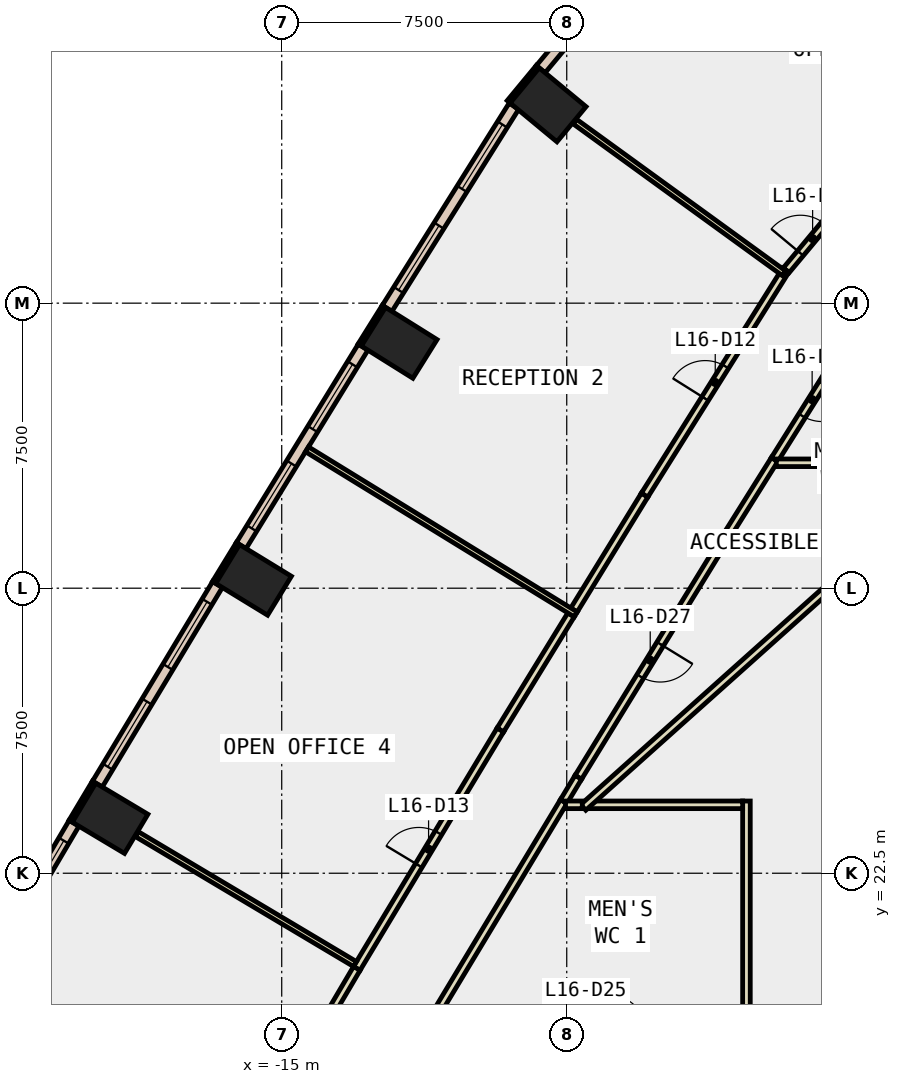
"""IFC4 building model, lengths in metres.
Left out: names, types, materials, properties, quantities, classifications, styles, units other than length and angle.
Written with IfcOpenShell. Run it as: python <this file> out.ifc"""

import sys

from ifc_helpers import new_model, si_unit, direction, frame, frame_2d, origin, origin_2d, place, context, subcontext, project, spatial, rectangle, extrude, element, fill, save


model = new_model("IFC4")
c1 = context("Model", 3, precision=1e-05, world=origin(), true_north=direction((0.0, 1.0)))
c2 = subcontext(c1, "Body", "Model", "MODEL_VIEW")
j1 = project(units=[si_unit("LENGTHUNIT", "METRE"), si_unit("PLANEANGLEUNIT", "RADIAN")], contexts=[c1])
p1 = place(None, origin())
s1 = spatial("IfcSite", under=j1, at=p1, CompositionType="ELEMENT")
p2 = place(p1, origin())
s2 = spatial("IfcBuilding", under=s1, at=p2, CompositionType="ELEMENT")
p3 = place(p2, frame((0.0, 0.0, 77.0)))
s3 = spatial("IfcBuildingStorey", under=s2, at=p3, CompositionType="ELEMENT", Elevation=77.0)
for number, where, z_axis, x_axis in (
    (1, (-7.991, 42.718, -0.4), (0.0, 0.0, 1.0), (0.638, 0.77, 0.0)),
    (2, (-11.909, 36.457, -0.4), (0.0, 0.0, 1.0), (0.53, 0.848, 0.0)),
    (3, (-15.741, 30.219, -0.4), (0.0, 0.0, 1.0), (0.522, 0.853, 0.0)),
    (4, (-19.516, 23.947, -0.4), (0.0, 0.0, 1.0), (0.513, 0.858, 0.0)),
):
    element("IfcColumn", number, at=place(p3, frame(where, z_axis=z_axis, x_axis=x_axis)), inside=s3, PredefinedType="COLUMN", context=c2, shape_type="SweptSolid", body=[
        extrude(rectangle(XDim=1.2, YDim=1.6, at=origin_2d()), origin(), (0.0, 0.0, 1.0), 4.0),
    ])
for number, where, z_axis, x_axis in (
    (5, (-8.263, 43.722, 0.0), (0.0, 0.0, 1.0), (-0.638, -0.77, 0.0)),
    (6, (-12.312, 37.416, 0.0), (0.0, 0.0, 1.0), (-0.53, -0.848, 0.0)),
):
    element("IfcWall", number, at=place(p3, frame(where, z_axis=z_axis, x_axis=x_axis)), inside=s3, PredefinedType="STANDARD", context=c2, shape_type="SweptSolid", body=[
        extrude(rectangle(XDim=1.199, YDim=0.1, at=frame_2d((0.6, 0.0))), origin(), (0.0, 0.0, 1.0), 3.6),
    ])
p4 = place(p3, frame((-16.153, 31.174, 0.0), z_axis=(0.0, 0.0, 1.0), x_axis=(-0.521507599072, -0.853246637327, 0.0)))
e7 = element("IfcWall", 7, at=p4, inside=s3, PredefinedType="STANDARD", context=c2, shape_type="SweptSolid", body=[
    extrude(rectangle(XDim=1.2, YDim=0.1, at=frame_2d((0.6, 0.0))), origin(), (0.0, 0.0, 1.0), 3.6),
])
p5 = place(p3, frame((-19.938, 24.898, 0.0), z_axis=(0.0, 0.0, 1.0), x_axis=(-0.513238760752, -0.858245870635, 0.0)))
e8 = element("IfcWall", 8, at=p5, inside=s3, PredefinedType="STANDARD", context=c2, shape_type="SweptSolid", body=[
    extrude(rectangle(XDim=1.2, YDim=0.1, at=frame_2d((0.6, 0.0))), origin(), (0.0, 0.0, 1.0), 3.6),
])
p6 = place(p3, frame((-5.681, 46.658, 0.0), z_axis=(0.0, 0.0, 1.0), x_axis=(-0.640565172846, -0.767903808649, 0.0)))
e9 = element("IfcWall", 9, at=p6, inside=s3, PredefinedType="STANDARD", context=c2, shape_type="SweptSolid", body=[
    extrude(rectangle(XDim=3.909, YDim=0.3, at=frame_2d((1.955, 0.0))), origin(), (0.0, 0.0, 1.0), 3.6),
])
p7 = place(p6, frame((1.255, 0.0, 0.9)))
e10 = element("IfcOpeningElement", 10, at=p7, cuts=e9, PredefinedType="OPENING", context=c2, shape_type="SweptSolid", body=[
    extrude(rectangle(XDim=1.4, YDim=2.6, at=frame_2d((0.7, 1.3))), frame((0.0, 0.16, 0.0), z_axis=(0.0, -1.0, 0.0), x_axis=(1.0, 0.0, 0.0)), (0.0, 0.0, 1.0), 0.32),
])
p8 = place(p3, frame((-8.889, 42.684, 0.0), z_axis=(0.0, 0.0, 1.0), x_axis=(-0.531357111884, -0.847147932565, 0.0)))
e11 = element("IfcWall", 11, at=p8, inside=s3, PredefinedType="STANDARD", context=c2, shape_type="SweptSolid", body=[
    extrude(rectangle(XDim=6.282, YDim=0.3, at=frame_2d((3.141, 0.0))), origin(), (0.0, 0.0, 1.0), 3.6),
])
p9 = place(p8, frame((0.571, 0.0, 0.9)))
e12 = element("IfcOpeningElement", 12, at=p9, cuts=e11, PredefinedType="OPENING", context=c2, shape_type="SweptSolid", body=[
    extrude(rectangle(XDim=2.0, YDim=2.6, at=frame_2d((1.0, 1.3))), frame((0.0, 0.16, 0.0), z_axis=(0.0, -1.0, 0.0), x_axis=(1.0, 0.0, 0.0)), (0.0, 0.0, 1.0), 0.32),
])
p10 = place(p8, frame((3.712, 0.0, 0.9)))
e13 = element("IfcOpeningElement", 13, at=p10, cuts=e11, PredefinedType="OPENING", context=c2, shape_type="SweptSolid", body=[
    extrude(rectangle(XDim=2.0, YDim=2.6, at=frame_2d((1.0, 1.3))), frame((0.0, 0.16, 0.0), z_axis=(0.0, -1.0, 0.0), x_axis=(1.0, 0.0, 0.0)), (0.0, 0.0, 1.0), 0.32),
])
p11 = place(p3, frame((-12.858, 36.344, 0.0), z_axis=(0.0, 0.0, 1.0), x_axis=(-0.523421823151, -0.852073702827, 0.0)))
e14 = element("IfcWall", 14, at=p11, inside=s3, PredefinedType="STANDARD", context=c2, shape_type="SweptSolid", body=[
    extrude(rectangle(XDim=6.131, YDim=0.3, at=frame_2d((3.065, 0.0))), origin(), (0.0, 0.0, 1.0), 3.6),
])
p12 = place(p11, frame((0.533, 0.0, 0.9)))
e15 = element("IfcOpeningElement", 15, at=p12, cuts=e14, PredefinedType="OPENING", context=c2, shape_type="SweptSolid", body=[
    extrude(rectangle(XDim=2.0, YDim=2.6, at=frame_2d((1.0, 1.3))), frame((0.0, 0.16, 0.0), z_axis=(0.0, -1.0, 0.0), x_axis=(1.0, 0.0, 0.0)), (0.0, 0.0, 1.0), 0.32),
])
p13 = place(p11, frame((3.598, 0.0, 0.9)))
e16 = element("IfcOpeningElement", 16, at=p13, cuts=e14, PredefinedType="OPENING", context=c2, shape_type="SweptSolid", body=[
    extrude(rectangle(XDim=2.0, YDim=2.6, at=frame_2d((1.0, 1.3))), frame((0.0, 0.16, 0.0), z_axis=(0.0, -1.0, 0.0), x_axis=(1.0, 0.0, 0.0)), (0.0, 0.0, 1.0), 0.32),
])
p14 = place(p3, frame((-16.69, 30.097, 0.0), z_axis=(0.0, 0.0, 1.0), x_axis=(-0.515690089348, -0.856775193238, 0.0)))
e17 = element("IfcWall", 17, at=p14, inside=s3, PredefinedType="STANDARD", context=c2, shape_type="SweptSolid", body=[
    extrude(rectangle(XDim=6.13, YDim=0.3, at=frame_2d((3.065, 0.0))), origin(), (0.0, 0.0, 1.0), 3.6),
])
p15 = place(p14, frame((0.532, 0.0, 0.9)))
e18 = element("IfcOpeningElement", 18, at=p15, cuts=e17, PredefinedType="OPENING", context=c2, shape_type="SweptSolid", body=[
    extrude(rectangle(XDim=2.0, YDim=2.6, at=frame_2d((1.0, 1.3))), frame((0.0, 0.16, 0.0), z_axis=(0.0, -1.0, 0.0), x_axis=(1.0, 0.0, 0.0)), (0.0, 0.0, 1.0), 0.32),
])
p16 = place(p14, frame((3.597, 0.0, 0.9)))
e19 = element("IfcOpeningElement", 19, at=p16, cuts=e17, PredefinedType="OPENING", context=c2, shape_type="SweptSolid", body=[
    extrude(rectangle(XDim=2.0, YDim=2.6, at=frame_2d((1.0, 1.3))), frame((0.0, 0.16, 0.0), z_axis=(0.0, -1.0, 0.0), x_axis=(1.0, 0.0, 0.0)), (0.0, 0.0, 1.0), 0.32),
])
p17 = place(p3, frame((-20.464, 23.816, 0.0), z_axis=(0.0, 0.0, 1.0), x_axis=(-0.507716058644, -0.861524465001, 0.0)))
e20 = element("IfcWall", 20, at=p17, inside=s3, PredefinedType="STANDARD", context=c2, shape_type="SweptSolid", body=[
    extrude(rectangle(XDim=6.131, YDim=0.3, at=frame_2d((3.065, 0.0))), origin(), (0.0, 0.0, 1.0), 3.6),
])
p18 = place(p17, frame((0.533, 0.0, 0.9)))
e21 = element("IfcOpeningElement", 21, at=p18, cuts=e20, PredefinedType="OPENING", context=c2, shape_type="SweptSolid", body=[
    extrude(rectangle(XDim=2.0, YDim=2.6, at=frame_2d((1.0, 1.3))), frame((0.0, 0.16, 0.0), z_axis=(0.0, -1.0, 0.0), x_axis=(1.0, 0.0, 0.0)), (0.0, 0.0, 1.0), 0.32),
])
p19 = place(p17, frame((3.598, 0.0, 0.9)))
e22 = element("IfcOpeningElement", 22, at=p19, cuts=e20, PredefinedType="OPENING", context=c2, shape_type="SweptSolid", body=[
    extrude(rectangle(XDim=2.0, YDim=2.6, at=frame_2d((1.0, 1.3))), frame((0.0, 0.16, 0.0), z_axis=(0.0, -1.0, 0.0), x_axis=(1.0, 0.0, 0.0)), (0.0, 0.0, 1.0), 0.32),
])
p20 = place(p3, frame((-7.58, 24.386, 0.0), z_axis=(0.0, 0.0, 1.0), x_axis=(-0.51574664882, -0.85674114774, 0.0)))
e23 = element("IfcWall", 23, at=p20, inside=s3, PredefinedType="PARTITIONING", context=c2, shape_type="SweptSolid", body=[
    extrude(rectangle(XDim=6.484, YDim=0.2, at=frame_2d((3.242, 0.0))), origin(), (0.0, 0.0, 1.0), 3.6),
])
p21 = place(p3, frame((-2.031, 33.385, 0.0), z_axis=(0.0, 0.0, 1.0), x_axis=(-0.531358798686, -0.84714687455, 0.0)))
e24 = element("IfcWall", 24, at=p21, inside=s3, PredefinedType="PARTITIONING", context=c2, shape_type="SweptSolid", body=[
    extrude(rectangle(XDim=2.597, YDim=0.2, at=frame_2d((1.298, 0.0))), origin(), (0.0, 0.0, 1.0), 3.6),
])
p22 = place(p3, frame((-3.411, 31.185, 0.0), z_axis=(0.0, 0.0, 1.0), x_axis=(-0.523464329994, -0.852047589765, 0.0)))
e25 = element("IfcWall", 25, at=p22, inside=s3, PredefinedType="PARTITIONING", context=c2, shape_type="SweptSolid", body=[
    extrude(rectangle(XDim=7.231, YDim=0.2, at=frame_2d((3.615, 0.0))), origin(), (0.0, 0.0, 1.0), 3.6),
])
p23 = place(p22, frame((3.115, 0.0, 0.0)))
e26 = element("IfcOpeningElement", 26, at=p23, cuts=e25, PredefinedType="OPENING", context=c2, shape_type="SweptSolid", body=[
    extrude(rectangle(XDim=1.0, YDim=2.1, at=frame_2d((0.5, 1.05))), frame((0.0, 0.11, 0.0), z_axis=(0.0, -1.0, 0.0), x_axis=(1.0, 0.0, 0.0)), (0.0, 0.0, 1.0), 0.22),
])
p24 = place(p3, frame((-7.196, 25.024, 0.0), z_axis=(0.0, 0.0, 1.0), x_axis=(-0.515748848873, -0.856739823334, 0.0)))
e27 = element("IfcWall", 27, at=p24, inside=s3, PredefinedType="PARTITIONING", context=c2, shape_type="SweptSolid", body=[
    extrude(rectangle(XDim=0.745, YDim=0.2, at=frame_2d((0.372, 0.0))), origin(), (0.0, 0.0, 1.0), 3.6),
])
p25 = place(p3, frame((0.053, 36.708, 0.0), z_axis=(0.0, 0.0, 1.0), x_axis=(-0.53130190932, -0.847182554797, 0.0)))
e28 = element("IfcWall", 28, at=p25, inside=s3, PredefinedType="PARTITIONING", context=c2, shape_type="SweptSolid", body=[
    extrude(rectangle(XDim=3.922, YDim=0.2, at=frame_2d((1.961, 0.0))), origin(), (0.0, 0.0, 1.0), 3.6),
])
p26 = place(p25, frame((1.562, 0.0, 0.0)))
e29 = element("IfcOpeningElement", 29, at=p26, cuts=e28, PredefinedType="OPENING", context=c2, shape_type="SweptSolid", body=[
    extrude(rectangle(XDim=1.0, YDim=2.1, at=frame_2d((0.5, 1.05))), frame((0.0, 0.11, 0.0), z_axis=(0.0, -1.0, 0.0), x_axis=(1.0, 0.0, 0.0)), (0.0, 0.0, 1.0), 0.22),
])
p27 = place(p3, frame((-1.724, 38.365, 0.0), z_axis=(0.0, 0.0, 1.0), x_axis=(0.64036162185, 0.768073559799, 0.0)))
e30 = element("IfcWall", 30, at=p27, inside=s3, PredefinedType="PARTITIONING", context=c2, shape_type="SweptSolid", body=[
    extrude(rectangle(XDim=2.168, YDim=0.2, at=frame_2d((1.084, 0.0))), origin(), (0.0, 0.0, 1.0), 3.6),
])
p28 = place(p27, frame((0.584, 0.0, 0.0)))
e31 = element("IfcOpeningElement", 31, at=p28, cuts=e30, PredefinedType="OPENING", context=c2, shape_type="SweptSolid", body=[
    extrude(rectangle(XDim=1.0, YDim=2.1, at=frame_2d((0.5, 1.05))), frame((0.0, 0.11, 0.0), z_axis=(0.0, -1.0, 0.0), x_axis=(1.0, 0.0, 0.0)), (0.0, 0.0, 1.0), 0.22),
])
p29 = place(p3, frame((-7.309, 29.426, 0.0), z_axis=(0.0, 0.0, 1.0), x_axis=(0.523617783711, 0.851953294836, 0.0)))
e32 = element("IfcWall", 32, at=p29, inside=s3, PredefinedType="PARTITIONING", context=c2, shape_type="SweptSolid", body=[
    extrude(rectangle(XDim=3.551, YDim=0.2, at=frame_2d((1.775, 0.0))), origin(), (0.0, 0.0, 1.0), 3.6),
])
p30 = place(p3, frame((-5.45, 32.451, 0.0), z_axis=(0.0, 0.0, 1.0), x_axis=(0.531388870359, 0.847128011849, 0.0)))
e33 = element("IfcWall", 33, at=p30, inside=s3, PredefinedType="PARTITIONING", context=c2, shape_type="SweptSolid", body=[
    extrude(rectangle(XDim=6.991, YDim=0.2, at=frame_2d((3.495, 0.0))), origin(), (0.0, 0.0, 1.0), 3.6),
])
p31 = place(p30, frame((2.996, 0.0, 0.0)))
e34 = element("IfcOpeningElement", 34, at=p31, cuts=e33, PredefinedType="OPENING", context=c2, shape_type="SweptSolid", body=[
    extrude(rectangle(XDim=1.0, YDim=2.1, at=frame_2d((0.5, 1.05))), frame((0.0, 0.11, 0.0), z_axis=(0.0, -1.0, 0.0), x_axis=(1.0, 0.0, 0.0)), (0.0, 0.0, 1.0), 0.22),
])
p32 = place(p3, frame((-13.025, 19.995, 0.0), z_axis=(0.0, 0.0, 1.0), x_axis=(0.515828195336, 0.856692052546, 0.0)))
e35 = element("IfcWall", 35, at=p32, inside=s3, PredefinedType="PARTITIONING", context=c2, shape_type="SweptSolid", body=[
    extrude(rectangle(XDim=7.326, YDim=0.2, at=frame_2d((3.663, 0.0))), origin(), (0.0, 0.0, 1.0), 3.6),
])
p33 = place(p32, frame((3.163, 0.0, 0.0)))
e36 = element("IfcOpeningElement", 36, at=p33, cuts=e35, PredefinedType="OPENING", context=c2, shape_type="SweptSolid", body=[
    extrude(rectangle(XDim=1.0, YDim=2.1, at=frame_2d((0.5, 1.05))), frame((0.0, 0.11, 0.0), z_axis=(0.0, -1.0, 0.0), x_axis=(1.0, 0.0, 0.0)), (0.0, 0.0, 1.0), 0.22),
])
p34 = place(p3, frame((-9.246, 26.271, 0.0), z_axis=(0.0, 0.0, 1.0), x_axis=(0.523341833043, 0.852122834917, 0.0)))
e37 = element("IfcWall", 37, at=p34, inside=s3, PredefinedType="PARTITIONING", context=c2, shape_type="SweptSolid", body=[
    extrude(rectangle(XDim=3.552, YDim=0.2, at=frame_2d((1.776, 0.0))), origin(), (0.0, 0.0, 1.0), 3.6),
])
p35 = place(p3, frame((-16.669, 13.811, 0.0), z_axis=(0.0, 0.0, 1.0), x_axis=(0.507777955495, 0.861487984776, 0.0)))
e38 = element("IfcWall", 38, at=p35, inside=s3, PredefinedType="PARTITIONING", context=c2, shape_type="SweptSolid", body=[
    extrude(rectangle(XDim=7.178, YDim=0.2, at=frame_2d((3.589, 0.0))), origin(), (0.0, 0.0, 1.0), 3.6),
])
p36 = place(p35, frame((3.164, 0.0, 0.0)))
e39 = element("IfcOpeningElement", 39, at=p36, cuts=e38, PredefinedType="OPENING", context=c2, shape_type="SweptSolid", body=[
    extrude(rectangle(XDim=1.0, YDim=2.1, at=frame_2d((0.5, 1.05))), frame((0.0, 0.11, 0.0), z_axis=(0.0, -1.0, 0.0), x_axis=(1.0, 0.0, 0.0)), (0.0, 0.0, 1.0), 0.22),
])
p37 = place(p3, frame((-2.771, 18.4, 0.0), z_axis=(0.0, 0.0, 1.0), x_axis=(0.0, 1.0, 0.0)))
e40 = element("IfcWall", 40, at=p37, inside=s3, PredefinedType="PARTITIONING", context=c2, shape_type="SweptSolid", body=[
    extrude(rectangle(XDim=6.0, YDim=0.2, at=frame_2d((3.0, 0.0))), origin(), (0.0, 0.0, 1.0), 3.6),
])
p38 = place(p3, frame((-2.871, 24.3, 0.0), z_axis=(0.0, 0.0, 1.0), x_axis=(-1.0, 0.0, 0.0)))
e41 = element("IfcWall", 41, at=p38, inside=s3, PredefinedType="PARTITIONING", context=c2, shape_type="SweptSolid", body=[
    extrude(rectangle(XDim=4.02, YDim=0.2, at=frame_2d((2.01, 0.0))), origin(), (0.0, 0.0, 1.0), 3.6),
])
p39 = place(p3, frame((-7.065, 24.233, 0.0), z_axis=(0.0, 0.0, 1.0), x_axis=(0.745362618546, 0.666659258448, 0.0)))
e42 = element("IfcWall", 42, at=p39, inside=s3, PredefinedType="PARTITIONING", context=c2, shape_type="SweptSolid", body=[
    extrude(rectangle(XDim=9.579, YDim=0.2, at=frame_2d((4.79, 0.0))), origin(), (0.0, 0.0, 1.0), 3.6),
])
p40 = place(p3, frame((-7.532, 24.3, 0.0), z_axis=(0.0, 0.0, 1.0), x_axis=(1.0, 0.0, 0.0)))
e43 = element("IfcWall", 43, at=p40, inside=s3, PredefinedType="PARTITIONING", context=c2, shape_type="SweptSolid", body=[
    extrude(rectangle(XDim=0.441, YDim=0.2, at=frame_2d((0.22, 0.0))), origin(), (0.0, 0.0, 1.0), 3.6),
])
p41 = place(p3, frame((-1.985, 33.3, 0.0), z_axis=(0.0, 0.0, 1.0), x_axis=(1.0, 0.0, 0.0)))
e44 = element("IfcWall", 44, at=p41, inside=s3, PredefinedType="PARTITIONING", context=c2, shape_type="SweptSolid", body=[
    extrude(rectangle(XDim=1.885, YDim=0.2, at=frame_2d((0.942, 0.0))), origin(), (0.0, 0.0, 1.0), 3.6),
])
p42 = place(p3, frame((-1.788, 38.289, 0.0), z_axis=(0.0, 0.0, 1.0), x_axis=(-0.809417495555, 0.587233614408, 0.0)))
e45 = element("IfcWall", 45, at=p42, inside=s3, PredefinedType="PARTITIONING", context=c2, shape_type="SweptSolid", body=[
    extrude(rectangle(XDim=6.796, YDim=0.15, at=frame_2d((3.398, 0.0))), origin(), (0.0, 0.0, 1.0), 3.6),
])
p43 = place(p3, frame((-7.263, 29.31, 0.0), z_axis=(0.0, 0.0, 1.0), x_axis=(-0.85208929269, 0.523396443706, 0.0)))
e46 = element("IfcWall", 46, at=p43, inside=s3, PredefinedType="PARTITIONING", context=c2, shape_type="SweptSolid", body=[
    extrude(rectangle(XDim=8.3, YDim=0.15, at=frame_2d((4.15, 0.0))), origin(), (0.0, 0.0, 1.0), 3.6),
])
p44 = place(p3, frame((-13.072, 20.11, 0.0), z_axis=(0.0, 0.0, 1.0), x_axis=(-0.859168554094, 0.511692676961, 0.0)))
e47 = element("IfcWall", 47, at=p44, inside=s3, PredefinedType="PARTITIONING", context=c2, shape_type="SweptSolid", body=[
    extrude(rectangle(XDim=6.68, YDim=0.15, at=frame_2d((3.34, 0.0))), origin(), (0.0, 0.0, 1.0), 3.6),
])
p45 = place(p9, origin())
e48 = element("IfcWindow", 48, at=p45, inside=s3, PartitioningType="SINGLE_PANEL", PredefinedType="WINDOW", context=c2, shape_type="SweptSolid", body=[
    extrude(rectangle(XDim=2.0, YDim=2.6, at=frame_2d((1.0, 1.3))), frame((0.0, 0.03, 0.0), z_axis=(0.0, -1.0, 0.0), x_axis=(1.0, 0.0, 0.0)), (0.0, 0.0, 1.0), 0.06),
])
fill(e12, e48)
p46 = place(p10, origin())
e49 = element("IfcWindow", 49, at=p46, inside=s3, PartitioningType="SINGLE_PANEL", PredefinedType="WINDOW", context=c2, shape_type="SweptSolid", body=[
    extrude(rectangle(XDim=2.0, YDim=2.6, at=frame_2d((1.0, 1.3))), frame((0.0, 0.03, 0.0), z_axis=(0.0, -1.0, 0.0), x_axis=(1.0, 0.0, 0.0)), (0.0, 0.0, 1.0), 0.06),
])
fill(e13, e49)
p47 = place(p12, origin())
e50 = element("IfcWindow", 50, at=p47, inside=s3, PartitioningType="SINGLE_PANEL", PredefinedType="WINDOW", context=c2, shape_type="SweptSolid", body=[
    extrude(rectangle(XDim=2.0, YDim=2.6, at=frame_2d((1.0, 1.3))), frame((0.0, 0.03, 0.0), z_axis=(0.0, -1.0, 0.0), x_axis=(1.0, 0.0, 0.0)), (0.0, 0.0, 1.0), 0.06),
])
fill(e15, e50)
p48 = place(p13, origin())
e51 = element("IfcWindow", 51, at=p48, inside=s3, PartitioningType="SINGLE_PANEL", PredefinedType="WINDOW", context=c2, shape_type="SweptSolid", body=[
    extrude(rectangle(XDim=2.0, YDim=2.6, at=frame_2d((1.0, 1.3))), frame((0.0, 0.03, 0.0), z_axis=(0.0, -1.0, 0.0), x_axis=(1.0, 0.0, 0.0)), (0.0, 0.0, 1.0), 0.06),
])
fill(e16, e51)
p49 = place(p15, origin())
e52 = element("IfcWindow", 52, at=p49, inside=s3, PartitioningType="SINGLE_PANEL", PredefinedType="WINDOW", context=c2, shape_type="SweptSolid", body=[
    extrude(rectangle(XDim=2.0, YDim=2.6, at=frame_2d((1.0, 1.3))), frame((0.0, 0.03, 0.0), z_axis=(0.0, -1.0, 0.0), x_axis=(1.0, 0.0, 0.0)), (0.0, 0.0, 1.0), 0.06),
])
fill(e18, e52)
p50 = place(p16, origin())
e53 = element("IfcWindow", 53, at=p50, inside=s3, PartitioningType="SINGLE_PANEL", PredefinedType="WINDOW", context=c2, shape_type="SweptSolid", body=[
    extrude(rectangle(XDim=2.0, YDim=2.6, at=frame_2d((1.0, 1.3))), frame((0.0, 0.03, 0.0), z_axis=(0.0, -1.0, 0.0), x_axis=(1.0, 0.0, 0.0)), (0.0, 0.0, 1.0), 0.06),
])
fill(e19, e53)
p51 = place(p18, origin())
e54 = element("IfcWindow", 54, at=p51, inside=s3, PartitioningType="SINGLE_PANEL", PredefinedType="WINDOW", context=c2, shape_type="SweptSolid", body=[
    extrude(rectangle(XDim=2.0, YDim=2.6, at=frame_2d((1.0, 1.3))), frame((0.0, 0.03, 0.0), z_axis=(0.0, -1.0, 0.0), x_axis=(1.0, 0.0, 0.0)), (0.0, 0.0, 1.0), 0.06),
])
fill(e21, e54)
p52 = place(p28, origin())
e55 = element("IfcDoor", 55, at=p52, inside=s3, OperationType="SINGLE_SWING_LEFT", PredefinedType="DOOR", context=c2, shape_type="SweptSolid", body=[
    extrude(rectangle(XDim=1.0, YDim=2.1, at=frame_2d((0.5, 1.05))), frame((0.0, 0.025, 0.0), z_axis=(0.0, -1.0, 0.0), x_axis=(1.0, 0.0, 0.0)), (0.0, 0.0, 1.0), 0.05),
])
fill(e31, e55)
p53 = place(p31, origin())
e56 = element("IfcDoor", 56, at=p53, inside=s3, OperationType="SINGLE_SWING_LEFT", PredefinedType="DOOR", context=c2, shape_type="SweptSolid", body=[
    extrude(rectangle(XDim=1.0, YDim=2.1, at=frame_2d((0.5, 1.05))), frame((0.0, 0.025, 0.0), z_axis=(0.0, -1.0, 0.0), x_axis=(1.0, 0.0, 0.0)), (0.0, 0.0, 1.0), 0.05),
])
fill(e34, e56)
p54 = place(p33, origin())
e57 = element("IfcDoor", 57, at=p54, inside=s3, OperationType="SINGLE_SWING_LEFT", PredefinedType="DOOR", context=c2, shape_type="SweptSolid", body=[
    extrude(rectangle(XDim=1.0, YDim=2.1, at=frame_2d((0.5, 1.05))), frame((0.0, 0.025, 0.0), z_axis=(0.0, -1.0, 0.0), x_axis=(1.0, 0.0, 0.0)), (0.0, 0.0, 1.0), 0.05),
])
fill(e36, e57)
p55 = place(p23, origin())
e58 = element("IfcDoor", 58, at=p55, inside=s3, OperationType="SINGLE_SWING_LEFT", PredefinedType="DOOR", context=c2, shape_type="SweptSolid", body=[
    extrude(rectangle(XDim=1.0, YDim=2.1, at=frame_2d((0.5, 1.05))), frame((0.0, 0.025, 0.0), z_axis=(0.0, -1.0, 0.0), x_axis=(1.0, 0.0, 0.0)), (0.0, 0.0, 1.0), 0.05),
])
fill(e26, e58)
p56 = place(p26, origin())
e59 = element("IfcDoor", 59, at=p56, inside=s3, OperationType="SINGLE_SWING_LEFT", PredefinedType="DOOR", context=c2, shape_type="SweptSolid", body=[
    extrude(rectangle(XDim=1.0, YDim=2.1, at=frame_2d((0.5, 1.05))), frame((0.0, 0.025, 0.0), z_axis=(0.0, -1.0, 0.0), x_axis=(1.0, 0.0, 0.0)), (0.0, 0.0, 1.0), 0.05),
])
fill(e29, e59)
save(model, sys.argv[1])
